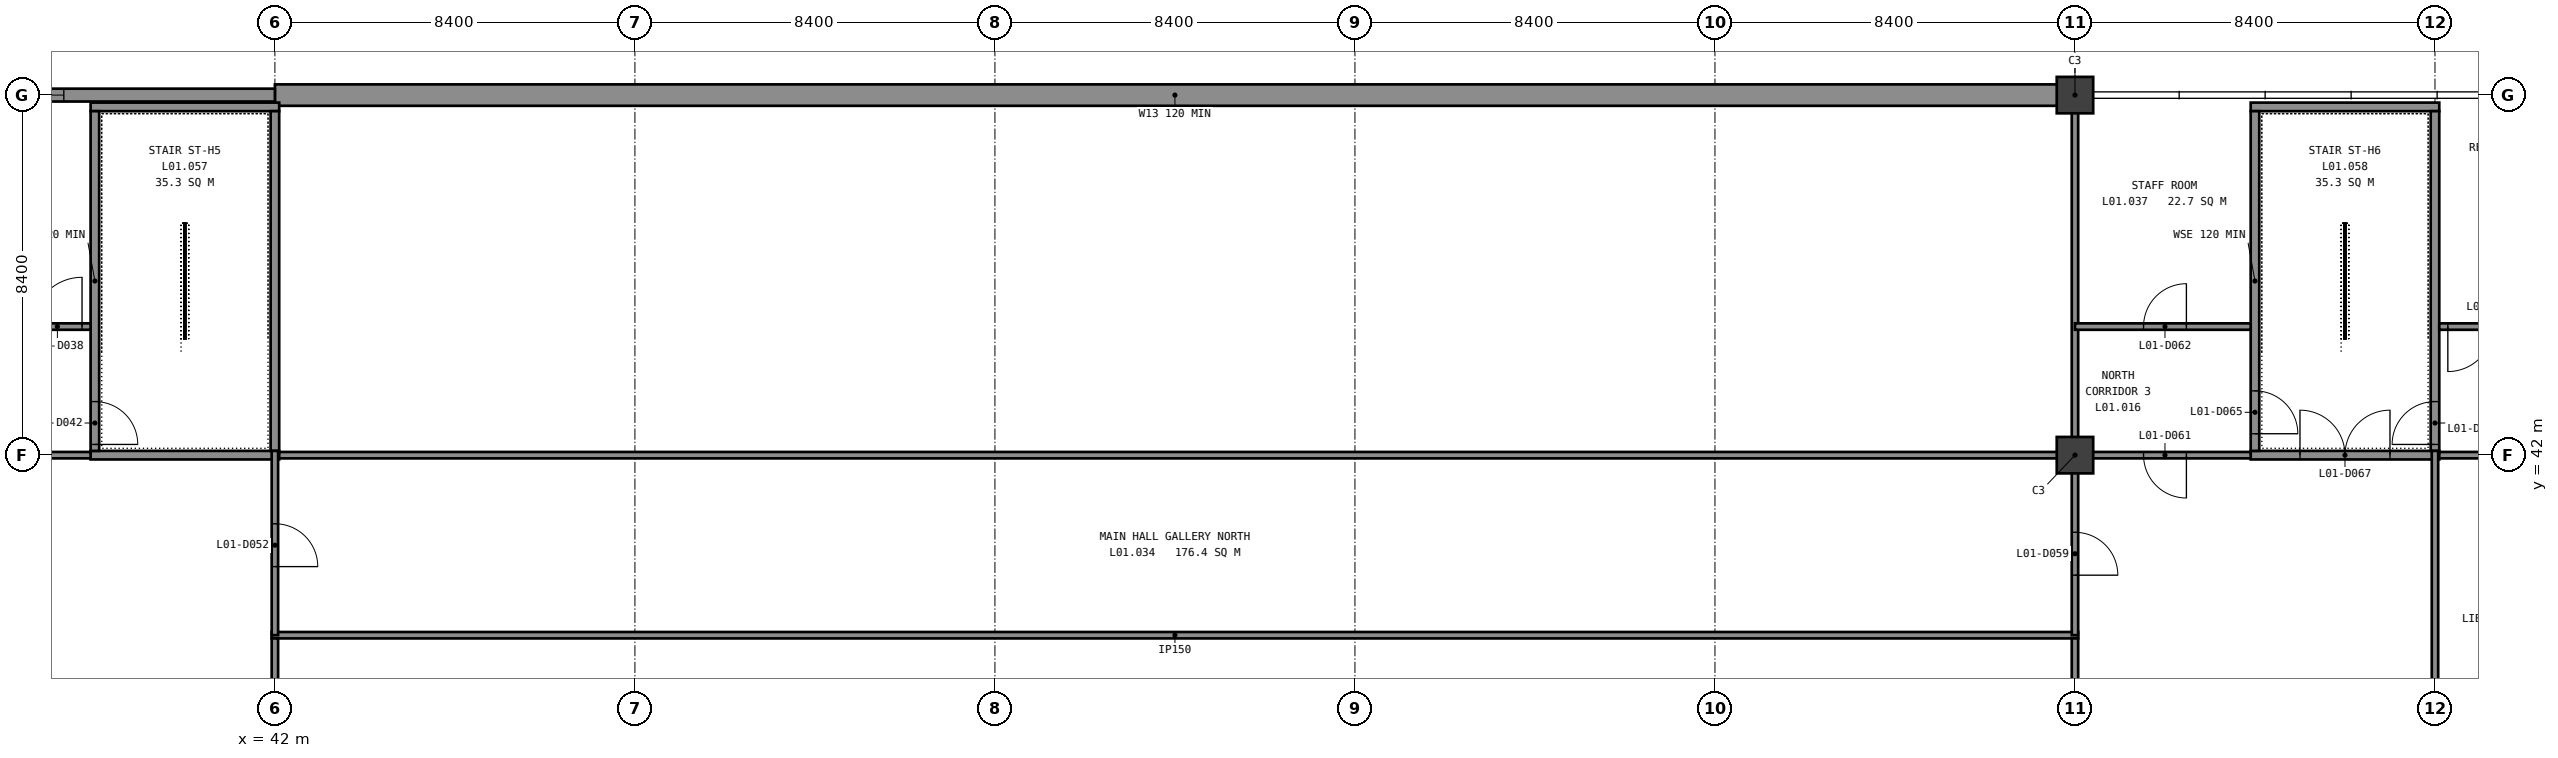
"""IFC4 building model, lengths in metres.
Left out: names, types, materials, properties, quantities, classifications, styles, units other than length and angle.
Written with IfcOpenShell. Run it as: python <this file> out.ifc"""

import sys

from ifc_helpers import new_model, si_unit, direction, frame, frame_2d, origin, origin_2d, place, context, subcontext, project, spatial, rectangle, extrude, element, fill, save


model = new_model("IFC4")
c1 = context("Model", 3, precision=1e-05, world=origin(), true_north=direction((0.0, 1.0)))
c2 = subcontext(c1, "Body", "Model", "MODEL_VIEW")
j1 = project(units=[si_unit("LENGTHUNIT", "METRE"), si_unit("PLANEANGLEUNIT", "RADIAN")], contexts=[c1])
p1 = place(None, origin())
s1 = spatial("IfcSite", under=j1, at=p1, CompositionType="ELEMENT")
p2 = place(p1, origin())
s2 = spatial("IfcBuilding", under=s1, at=p2, CompositionType="ELEMENT")
p3 = place(p2, frame((0.0, 0.0, 5.4)))
s3 = spatial("IfcBuildingStorey", under=s2, at=p3, CompositionType="ELEMENT", Elevation=5.4)
for number, where, z_axis, x_axis in (
    (1, (84.0, 42.0, -0.3), (0.0, 0.0, 1.0), (1.0, 0.0, 0.0)),
    (2, (84.0, 50.4, -0.3), (0.0, 0.0, 1.0), (1.0, 0.0, 0.0)),
):
    element("IfcColumn", number, at=place(p3, frame(where, z_axis=z_axis, x_axis=x_axis)), inside=s3, PredefinedType="COLUMN", context=c2, shape_type="SweptSolid", body=[
        extrude(rectangle(XDim=0.85, YDim=0.85, at=origin_2d()), origin(), (0.0, 0.0, 1.0), 4.55),
    ])
p4 = place(p3, frame((42.0, 50.4, -0.3), z_axis=(0.0, 0.0, 1.0), x_axis=(1.0, 0.0, 0.0)))
e3 = element("IfcWall", 3, at=p4, inside=s3, PredefinedType="SHEAR", context=c2, shape_type="SweptSolid", body=[
    extrude(rectangle(XDim=42.0, YDim=0.5, at=frame_2d((21.0, 0.0))), origin(), (0.0, 0.0, 1.0), 4.55),
])
p5 = place(p3, frame((33.925, 50.4, 0.0), z_axis=(0.0, 0.0, 1.0), x_axis=(1.0, 0.0, 0.0)))
e4 = element("IfcWall", 4, at=p5, inside=s3, PredefinedType="STANDARD", context=c2, shape_type="SweptSolid", body=[
    extrude(rectangle(XDim=8.075, YDim=0.3, at=frame_2d((4.038, 0.0))), origin(), (0.0, 0.0, 1.0), 4.2),
])
p6 = place(p5, frame((0.75, 0.0, 0.9)))
e5 = element("IfcOpeningElement", 5, at=p6, cuts=e4, PredefinedType="OPENING", context=c2, shape_type="SweptSolid", body=[
    extrude(rectangle(XDim=2.4, YDim=1.5, at=frame_2d((1.2, 0.75))), frame((0.0, 0.16, 0.0), z_axis=(0.0, -1.0, 0.0), x_axis=(1.0, 0.0, 0.0)), (0.0, 0.0, 1.0), 0.32),
])
for number, where, z_axis, x_axis in (
    (6, (37.7, 42.0, -0.3), (0.0, 0.0, 1.0), (1.0, 0.0, 0.0)),
    (7, (37.7, 50.125, -0.3), (0.0, 0.0, 1.0), (1.0, 0.0, 0.0)),
):
    element("IfcWall", number, at=place(p3, frame(where, z_axis=z_axis, x_axis=x_axis)), inside=s3, PredefinedType="SHEAR", context=c2, shape_type="SweptSolid", body=[
        extrude(rectangle(XDim=4.4, YDim=0.2, at=frame_2d((2.2, 0.0))), origin(), (0.0, 0.0, 1.0), 4.5),
    ])
p7 = place(p3, frame((37.8, 42.1, -0.3), z_axis=(0.0, 0.0, 1.0), x_axis=(0.0, 1.0, 0.0)))
e8 = element("IfcWall", 8, at=p7, inside=s3, PredefinedType="SHEAR", context=c2, shape_type="SweptSolid", body=[
    extrude(rectangle(XDim=7.925, YDim=0.2, at=frame_2d((3.962, 0.0))), origin(), (0.0, 0.0, 1.0), 4.5),
])
p8 = place(p7, frame((0.15, 0.0, 0.3)))
e9 = element("IfcOpeningElement", 9, at=p8, cuts=e8, PredefinedType="OPENING", context=c2, shape_type="SweptSolid", body=[
    extrude(rectangle(XDim=1.0, YDim=2.1, at=frame_2d((0.5, 1.05))), frame((0.0, 0.11, 0.0), z_axis=(0.0, -1.0, 0.0), x_axis=(1.0, 0.0, 0.0)), (0.0, 0.0, 1.0), 0.22),
])
p9 = place(p3, frame((42.0, 42.1, -0.3), z_axis=(0.0, 0.0, 1.0), x_axis=(0.0, 1.0, 0.0)))
e10 = element("IfcWall", 10, at=p9, inside=s3, PredefinedType="SHEAR", context=c2, shape_type="SweptSolid", body=[
    extrude(rectangle(XDim=7.925, YDim=0.2, at=frame_2d((3.962, 0.0))), origin(), (0.0, 0.0, 1.0), 4.5),
])
p10 = place(p3, frame((88.1, 42.0, -0.3), z_axis=(0.0, 0.0, 1.0), x_axis=(1.0, 0.0, 0.0)))
e11 = element("IfcWall", 11, at=p10, inside=s3, PredefinedType="SHEAR", context=c2, shape_type="SweptSolid", body=[
    extrude(rectangle(XDim=4.4, YDim=0.2, at=frame_2d((2.2, 0.0))), origin(), (0.0, 0.0, 1.0), 4.5),
])
p11 = place(p10, frame((1.15, 0.0, 0.3)))
e12 = element("IfcOpeningElement", 12, at=p11, cuts=e11, PredefinedType="OPENING", context=c2, shape_type="SweptSolid", body=[
    extrude(rectangle(XDim=2.1, YDim=2.1, at=frame_2d((1.05, 1.05))), frame((0.0, 0.11, 0.0), z_axis=(0.0, -1.0, 0.0), x_axis=(1.0, 0.0, 0.0)), (0.0, 0.0, 1.0), 0.22),
])
p12 = place(p3, frame((88.1, 50.125, -0.3), z_axis=(0.0, 0.0, 1.0), x_axis=(1.0, 0.0, 0.0)))
e13 = element("IfcWall", 13, at=p12, inside=s3, PredefinedType="SHEAR", context=c2, shape_type="SweptSolid", body=[
    extrude(rectangle(XDim=4.4, YDim=0.2, at=frame_2d((2.2, 0.0))), origin(), (0.0, 0.0, 1.0), 4.5),
])
p13 = place(p3, frame((88.2, 42.1, -0.3), z_axis=(0.0, 0.0, 1.0), x_axis=(0.0, 1.0, 0.0)))
e14 = element("IfcWall", 14, at=p13, inside=s3, PredefinedType="SHEAR", context=c2, shape_type="SweptSolid", body=[
    extrude(rectangle(XDim=7.925, YDim=0.2, at=frame_2d((3.962, 0.0))), origin(), (0.0, 0.0, 1.0), 4.5),
])
p14 = place(p13, frame((0.4, 0.0, 0.3)))
e15 = element("IfcOpeningElement", 15, at=p14, cuts=e14, PredefinedType="OPENING", context=c2, shape_type="SweptSolid", body=[
    extrude(rectangle(XDim=1.0, YDim=2.1, at=frame_2d((0.5, 1.05))), frame((0.0, 0.11, 0.0), z_axis=(0.0, -1.0, 0.0), x_axis=(1.0, 0.0, 0.0)), (0.0, 0.0, 1.0), 0.22),
])
p15 = place(p3, frame((92.4, 42.1, -0.3), z_axis=(0.0, 0.0, 1.0), x_axis=(0.0, 1.0, 0.0)))
e16 = element("IfcWall", 16, at=p15, inside=s3, PredefinedType="SHEAR", context=c2, shape_type="SweptSolid", body=[
    extrude(rectangle(XDim=7.925, YDim=0.2, at=frame_2d((3.962, 0.0))), origin(), (0.0, 0.0, 1.0), 4.5),
])
p16 = place(p15, frame((0.15, 0.0, 0.3)))
e17 = element("IfcOpeningElement", 17, at=p16, cuts=e16, PredefinedType="OPENING", context=c2, shape_type="SweptSolid", body=[
    extrude(rectangle(XDim=1.0, YDim=2.1, at=frame_2d((0.5, 1.05))), frame((0.0, 0.11, 0.0), z_axis=(0.0, -1.0, 0.0), x_axis=(1.0, 0.0, 0.0)), (0.0, 0.0, 1.0), 0.22),
])
p17 = place(p3, frame((41.925, 37.8, -0.3), z_axis=(0.0, 0.0, 1.0), x_axis=(1.0, 0.0, 0.0)))
e18 = element("IfcWall", 18, at=p17, inside=s3, PredefinedType="PARTITIONING", context=c2, shape_type="SweptSolid", body=[
    extrude(rectangle(XDim=42.15, YDim=0.15, at=frame_2d((21.075, 0.0))), origin(), (0.0, 0.0, 1.0), 4.5),
])
p18 = place(p3, frame((42.1, 42.0, -0.3), z_axis=(0.0, 0.0, 1.0), x_axis=(1.0, 0.0, 0.0)))
e19 = element("IfcWall", 19, at=p18, inside=s3, PredefinedType="PARTITIONING", context=c2, shape_type="SweptSolid", body=[
    extrude(rectangle(XDim=41.9, YDim=0.15, at=frame_2d((20.95, 0.0))), origin(), (0.0, 0.0, 1.0), 4.5),
])
p19 = place(p3, frame((42.0, 33.7, -0.3), z_axis=(0.0, 0.0, 1.0), x_axis=(0.0, 1.0, 0.0)))
e20 = element("IfcWall", 20, at=p19, inside=s3, PredefinedType="PARTITIONING", context=c2, shape_type="SweptSolid", body=[
    extrude(rectangle(XDim=4.025, YDim=0.15, at=frame_2d((2.013, 0.0))), origin(), (0.0, 0.0, 1.0), 4.5),
])
p20 = place(p3, frame((84.0, 25.605, -0.3), z_axis=(0.0, 0.0, 1.0), x_axis=(0.0, 1.0, 0.0)))
e21 = element("IfcWall", 21, at=p20, inside=s3, PredefinedType="PARTITIONING", context=c2, shape_type="SweptSolid", body=[
    extrude(rectangle(XDim=12.12, YDim=0.15, at=frame_2d((6.06, 0.0))), origin(), (0.0, 0.0, 1.0), 3.9),
])
p21 = place(p3, frame((84.0, 42.075, -0.3), z_axis=(0.0, 0.0, 1.0), x_axis=(0.0, 1.0, 0.0)))
e22 = element("IfcWall", 22, at=p21, inside=s3, PredefinedType="PARTITIONING", context=c2, shape_type="SweptSolid", body=[
    extrude(rectangle(XDim=8.075, YDim=0.15, at=frame_2d((4.038, 0.0))), origin(), (0.0, 0.0, 1.0), 3.9),
])
p22 = place(p3, frame((25.2, 42.0, 0.0), z_axis=(0.0, 0.0, 1.0), x_axis=(1.0, 0.0, 0.0)))
e23 = element("IfcWall", 23, at=p22, inside=s3, PredefinedType="PARTITIONING", context=c2, shape_type="SweptSolid", body=[
    extrude(rectangle(XDim=12.5, YDim=0.15, at=frame_2d((6.25, 0.0))), origin(), (0.0, 0.0, 1.0), 4.2),
])
p23 = place(p22, frame((0.6, 0.0, 0.0)))
e24 = element("IfcOpeningElement", 24, at=p23, cuts=e23, PredefinedType="OPENING", context=c2, shape_type="SweptSolid", body=[
    extrude(rectangle(XDim=1.0, YDim=2.1, at=frame_2d((0.5, 1.05))), frame((0.0, 0.085, 0.0), z_axis=(0.0, -1.0, 0.0), x_axis=(1.0, 0.0, 0.0)), (0.0, 0.0, 1.0), 0.17),
])
p24 = place(p3, frame((83.925, 42.0, 0.0), z_axis=(0.0, 0.0, 1.0), x_axis=(1.0, 0.0, 0.0)))
e25 = element("IfcWall", 25, at=p24, inside=s3, PredefinedType="PARTITIONING", context=c2, shape_type="SweptSolid", body=[
    extrude(rectangle(XDim=4.175, YDim=0.15, at=frame_2d((2.087, 0.0))), origin(), (0.0, 0.0, 1.0), 4.2),
])
p25 = place(p24, frame((1.675, 0.0, 0.0)))
e26 = element("IfcOpeningElement", 26, at=p25, cuts=e25, PredefinedType="OPENING", context=c2, shape_type="SweptSolid", body=[
    extrude(rectangle(XDim=1.0, YDim=2.1, at=frame_2d((0.5, 1.05))), frame((0.0, 0.085, 0.0), z_axis=(0.0, -1.0, 0.0), x_axis=(1.0, 0.0, 0.0)), (0.0, 0.0, 1.0), 0.17),
])
p26 = place(p3, frame((92.5, 42.0, 0.0), z_axis=(0.0, 0.0, 1.0), x_axis=(1.0, 0.0, 0.0)))
e27 = element("IfcWall", 27, at=p26, inside=s3, PredefinedType="PARTITIONING", context=c2, shape_type="SweptSolid", body=[
    extrude(rectangle(XDim=8.605, YDim=0.15, at=frame_2d((4.302, 0.0))), origin(), (0.0, 0.0, 1.0), 4.2),
])
p27 = place(p3, frame((25.3, 45.0, 0.0), z_axis=(0.0, 0.0, 1.0), x_axis=(1.0, 0.0, 0.0)))
e28 = element("IfcWall", 28, at=p27, inside=s3, PredefinedType="PARTITIONING", context=c2, shape_type="SweptSolid", body=[
    extrude(rectangle(XDim=12.4, YDim=0.15, at=frame_2d((6.2, 0.0))), origin(), (0.0, 0.0, 1.0), 4.2),
])
p28 = place(p27, frame((0.2, 0.0, 0.0)))
e29 = element("IfcOpeningElement", 29, at=p28, cuts=e28, PredefinedType="OPENING", context=c2, shape_type="SweptSolid", body=[
    extrude(rectangle(XDim=1.15, YDim=2.1, at=frame_2d((0.575, 1.05))), frame((0.0, 0.085, 0.0), z_axis=(0.0, -1.0, 0.0), x_axis=(1.0, 0.0, 0.0)), (0.0, 0.0, 1.0), 0.17),
])
p29 = place(p27, frame((11.05, 0.0, 0.0)))
e30 = element("IfcOpeningElement", 30, at=p29, cuts=e28, PredefinedType="OPENING", context=c2, shape_type="SweptSolid", body=[
    extrude(rectangle(XDim=1.15, YDim=2.1, at=frame_2d((0.575, 1.05))), frame((0.0, 0.085, 0.0), z_axis=(0.0, -1.0, 0.0), x_axis=(1.0, 0.0, 0.0)), (0.0, 0.0, 1.0), 0.17),
])
p30 = place(p3, frame((84.0, 45.0, 0.0), z_axis=(0.0, 0.0, 1.0), x_axis=(1.0, 0.0, 0.0)))
e31 = element("IfcWall", 31, at=p30, inside=s3, PredefinedType="PARTITIONING", context=c2, shape_type="SweptSolid", body=[
    extrude(rectangle(XDim=4.1, YDim=0.15, at=frame_2d((2.05, 0.0))), origin(), (0.0, 0.0, 1.0), 4.2),
])
p31 = place(p30, frame((1.6, 0.0, 0.0)))
e32 = element("IfcOpeningElement", 32, at=p31, cuts=e31, PredefinedType="OPENING", context=c2, shape_type="SweptSolid", body=[
    extrude(rectangle(XDim=1.0, YDim=2.1, at=frame_2d((0.5, 1.05))), frame((0.0, 0.085, 0.0), z_axis=(0.0, -1.0, 0.0), x_axis=(1.0, 0.0, 0.0)), (0.0, 0.0, 1.0), 0.17),
])
p32 = place(p3, frame((92.5, 45.0, 0.0), z_axis=(0.0, 0.0, 1.0), x_axis=(1.0, 0.0, 0.0)))
e33 = element("IfcWall", 33, at=p32, inside=s3, PredefinedType="PARTITIONING", context=c2, shape_type="SweptSolid", body=[
    extrude(rectangle(XDim=20.8, YDim=0.15, at=frame_2d((10.4, 0.0))), origin(), (0.0, 0.0, 1.0), 4.2),
])
p33 = place(p32, frame((0.2, 0.0, 0.0)))
e34 = element("IfcOpeningElement", 34, at=p33, cuts=e33, PredefinedType="OPENING", context=c2, shape_type="SweptSolid", body=[
    extrude(rectangle(XDim=2.1, YDim=2.25, at=frame_2d((1.05, 1.125))), frame((0.0, 0.085, 0.0), z_axis=(0.0, -1.0, 0.0), x_axis=(1.0, 0.0, 0.0)), (0.0, 0.0, 1.0), 0.17),
])
p34 = place(p32, frame((18.5, 0.0, 0.0)))
e35 = element("IfcOpeningElement", 35, at=p34, cuts=e33, PredefinedType="OPENING", context=c2, shape_type="SweptSolid", body=[
    extrude(rectangle(XDim=2.1, YDim=2.25, at=frame_2d((1.05, 1.125))), frame((0.0, 0.085, 0.0), z_axis=(0.0, -1.0, 0.0), x_axis=(1.0, 0.0, 0.0)), (0.0, 0.0, 1.0), 0.17),
])
p35 = place(p3, frame((42.0, 37.8, 0.0), z_axis=(0.0, 0.0, 1.0), x_axis=(0.0, 1.0, 0.0)))
e36 = element("IfcWall", 36, at=p35, inside=s3, PredefinedType="PARTITIONING", context=c2, shape_type="SweptSolid", body=[
    extrude(rectangle(XDim=4.3, YDim=0.15, at=frame_2d((2.15, 0.0))), origin(), (0.0, 0.0, 1.0), 8.7),
])
p36 = place(p35, frame((1.6, 0.0, 0.0)))
e37 = element("IfcOpeningElement", 37, at=p36, cuts=e36, PredefinedType="OPENING", context=c2, shape_type="SweptSolid", body=[
    extrude(rectangle(XDim=1.0, YDim=2.1, at=frame_2d((0.5, 1.05))), frame((0.0, 0.085, 0.0), z_axis=(0.0, -1.0, 0.0), x_axis=(1.0, 0.0, 0.0)), (0.0, 0.0, 1.0), 0.17),
])
p37 = place(p3, frame((84.0, 37.8, 0.0), z_axis=(0.0, 0.0, 1.0), x_axis=(0.0, 1.0, 0.0)))
e38 = element("IfcWall", 38, at=p37, inside=s3, PredefinedType="PARTITIONING", context=c2, shape_type="SweptSolid", body=[
    extrude(rectangle(XDim=4.125, YDim=0.15, at=frame_2d((2.062, 0.0))), origin(), (0.0, 0.0, 1.0), 3.6),
])
p38 = place(p37, frame((1.4, 0.0, 0.0)))
e39 = element("IfcOpeningElement", 39, at=p38, cuts=e38, PredefinedType="OPENING", context=c2, shape_type="SweptSolid", body=[
    extrude(rectangle(XDim=1.0, YDim=2.1, at=frame_2d((0.5, 1.05))), frame((0.0, 0.085, 0.0), z_axis=(0.0, -1.0, 0.0), x_axis=(1.0, 0.0, 0.0)), (0.0, 0.0, 1.0), 0.17),
])
p39 = place(p3, frame((92.4, 33.295, 0.0), z_axis=(0.0, 0.0, 1.0), x_axis=(0.0, 1.0, 0.0)))
e40 = element("IfcWall", 40, at=p39, inside=s3, PredefinedType="PARTITIONING", context=c2, shape_type="SweptSolid", body=[
    extrude(rectangle(XDim=8.805, YDim=0.15, at=frame_2d((4.403, 0.0))), origin(), (0.0, 0.0, 1.0), 4.2),
])
p40 = place(p6, origin())
e41 = element("IfcWindow", 41, at=p40, inside=s3, PartitioningType="SINGLE_PANEL", PredefinedType="WINDOW", context=c2, shape_type="SweptSolid", body=[
    extrude(rectangle(XDim=2.4, YDim=1.5, at=frame_2d((1.2, 0.75))), frame((0.0, 0.03, 0.0), z_axis=(0.0, -1.0, 0.0), x_axis=(1.0, 0.0, 0.0)), (0.0, 0.0, 1.0), 0.06),
])
fill(e5, e41)
p41 = place(p8, origin())
e42 = element("IfcDoor", 42, at=p41, inside=s3, OperationType="SINGLE_SWING_LEFT", PredefinedType="DOOR", context=c2, shape_type="SweptSolid", body=[
    extrude(rectangle(XDim=1.0, YDim=2.1, at=frame_2d((0.5, 1.05))), frame((0.0, 0.025, 0.0), z_axis=(0.0, -1.0, 0.0), x_axis=(1.0, 0.0, 0.0)), (0.0, 0.0, 1.0), 0.05),
])
fill(e9, e42)
p42 = place(p11, origin())
e43 = element("IfcDoor", 43, at=p42, inside=s3, OperationType="DOUBLE_DOOR_SINGLE_SWING", PredefinedType="DOOR", context=c2, shape_type="SweptSolid", body=[
    extrude(rectangle(XDim=2.1, YDim=2.1, at=frame_2d((1.05, 1.05))), frame((0.0, 0.025, 0.0), z_axis=(0.0, -1.0, 0.0), x_axis=(1.0, 0.0, 0.0)), (0.0, 0.0, 1.0), 0.05),
])
fill(e12, e43)
p43 = place(p16, origin())
e44 = element("IfcDoor", 44, at=p43, inside=s3, OperationType="SINGLE_SWING_RIGHT", PredefinedType="DOOR", context=c2, shape_type="SweptSolid", body=[
    extrude(rectangle(XDim=1.0, YDim=2.1, at=frame_2d((0.5, 1.05))), frame((0.0, 0.025, 0.0), z_axis=(0.0, -1.0, 0.0), x_axis=(1.0, 0.0, 0.0)), (0.0, 0.0, 1.0), 0.05),
])
fill(e17, e44)
p44 = place(p29, origin())
e45 = element("IfcDoor", 45, at=p44, inside=s3, OperationType="SINGLE_SWING_LEFT", PredefinedType="DOOR", context=c2, shape_type="SweptSolid", body=[
    extrude(rectangle(XDim=1.15, YDim=2.1, at=frame_2d((0.575, 1.05))), frame((0.0, 0.025, 0.0), z_axis=(0.0, -1.0, 0.0), x_axis=(1.0, 0.0, 0.0)), (0.0, 0.0, 1.0), 0.05),
])
fill(e30, e45)
p45 = place(p31, origin())
e46 = element("IfcDoor", 46, at=p45, inside=s3, OperationType="SINGLE_SWING_LEFT", PredefinedType="DOOR", context=c2, shape_type="SweptSolid", body=[
    extrude(rectangle(XDim=1.0, YDim=2.1, at=frame_2d((0.5, 1.05))), frame((0.0, 0.025, 0.0), z_axis=(0.0, -1.0, 0.0), x_axis=(1.0, 0.0, 0.0)), (0.0, 0.0, 1.0), 0.05),
])
fill(e32, e46)
p46 = place(p33, origin())
e47 = element("IfcDoor", 47, at=p46, inside=s3, OperationType="DOUBLE_DOOR_SINGLE_SWING", PredefinedType="DOOR", context=c2, shape_type="SweptSolid", body=[
    extrude(rectangle(XDim=2.1, YDim=2.25, at=frame_2d((1.05, 1.125))), frame((0.0, 0.025, 0.0), z_axis=(0.0, -1.0, 0.0), x_axis=(1.0, 0.0, 0.0)), (0.0, 0.0, 1.0), 0.05),
])
fill(e34, e47)
p47 = place(p36, origin())
e48 = element("IfcDoor", 48, at=p47, inside=s3, OperationType="SINGLE_SWING_LEFT", PredefinedType="DOOR", context=c2, shape_type="SweptSolid", body=[
    extrude(rectangle(XDim=1.0, YDim=2.1, at=frame_2d((0.5, 1.05))), frame((0.0, 0.025, 0.0), z_axis=(0.0, -1.0, 0.0), x_axis=(1.0, 0.0, 0.0)), (0.0, 0.0, 1.0), 0.05),
])
fill(e37, e48)
p48 = place(p25, origin())
e49 = element("IfcDoor", 49, at=p48, inside=s3, OperationType="SINGLE_SWING_RIGHT", PredefinedType="DOOR", context=c2, shape_type="SweptSolid", body=[
    extrude(rectangle(XDim=1.0, YDim=2.1, at=frame_2d((0.5, 1.05))), frame((0.0, 0.025, 0.0), z_axis=(0.0, -1.0, 0.0), x_axis=(1.0, 0.0, 0.0)), (0.0, 0.0, 1.0), 0.05),
])
fill(e26, e49)
p49 = place(p14, origin())
e50 = element("IfcDoor", 50, at=p49, inside=s3, OperationType="SINGLE_SWING_LEFT", PredefinedType="DOOR", context=c2, shape_type="SweptSolid", body=[
    extrude(rectangle(XDim=1.0, YDim=2.1, at=frame_2d((0.5, 1.05))), frame((0.0, 0.025, 0.0), z_axis=(0.0, -1.0, 0.0), x_axis=(1.0, 0.0, 0.0)), (0.0, 0.0, 1.0), 0.05),
])
fill(e15, e50)
p50 = place(p38, origin())
e51 = element("IfcDoor", 51, at=p50, inside=s3, OperationType="SINGLE_SWING_LEFT", PredefinedType="DOOR", context=c2, shape_type="SweptSolid", body=[
    extrude(rectangle(XDim=1.0, YDim=2.1, at=frame_2d((0.5, 1.05))), frame((0.0, 0.025, 0.0), z_axis=(0.0, -1.0, 0.0), x_axis=(1.0, 0.0, 0.0)), (0.0, 0.0, 1.0), 0.05),
])
fill(e39, e51)
save(model, sys.argv[1])
